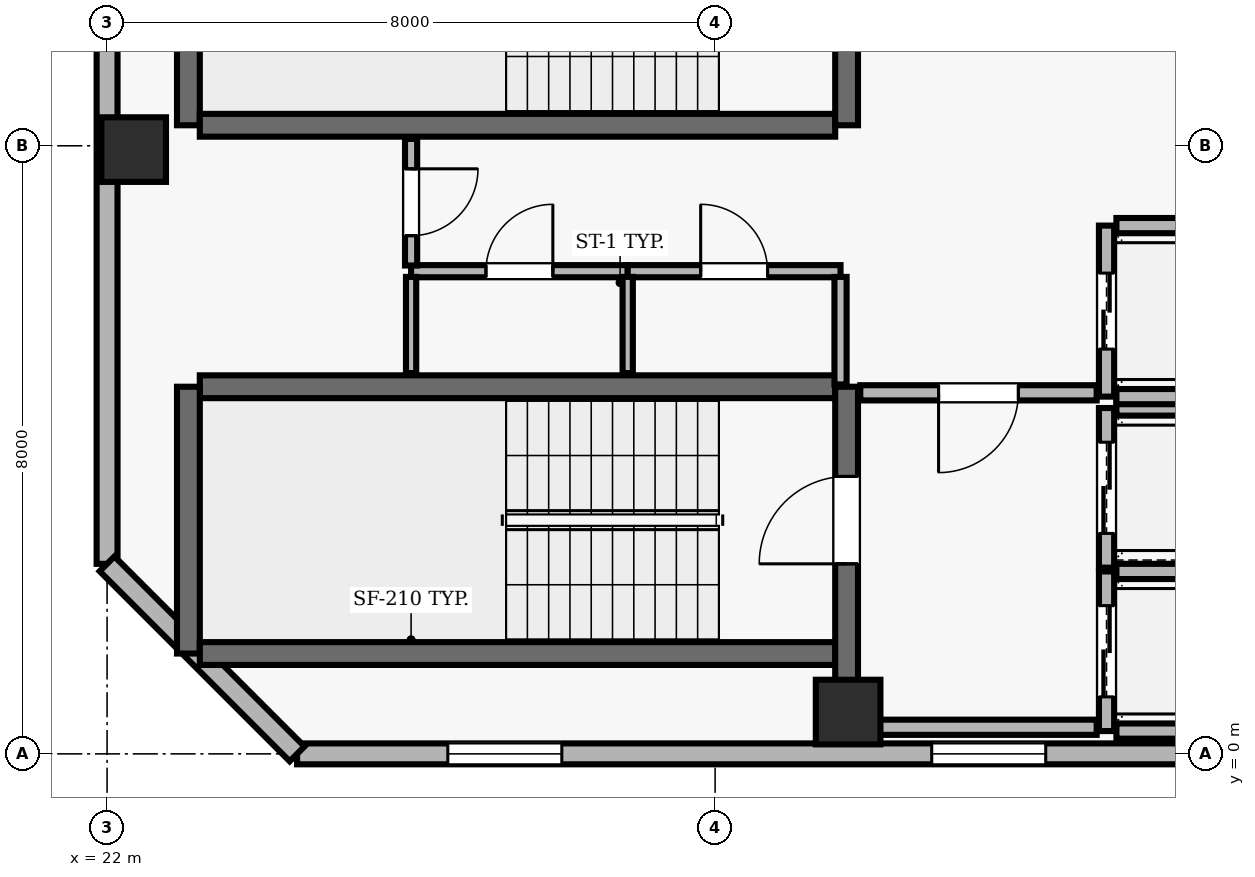
"""IFC4 building model, lengths in metres.
Left out: names, types, materials, properties, quantities, classifications, styles, units other than length and angle.
Written with IfcOpenShell. Run it as: python <this file> out.ifc"""

import sys

from ifc_helpers import new_model, si_unit, direction, frame, frame_2d, origin, origin_2d, place, context, subcontext, project, spatial, rectangle, extrude, element, fill, save


model = new_model("IFC4")
c1 = context("Model", 3, precision=1e-05, world=origin(), true_north=direction((0.0, 1.0)))
c2 = subcontext(c1, "Body", "Model", "MODEL_VIEW")
j1 = project(units=[si_unit("LENGTHUNIT", "METRE"), si_unit("PLANEANGLEUNIT", "RADIAN")], contexts=[c1])
p1 = place(None, origin())
s1 = spatial("IfcSite", under=j1, at=p1, CompositionType="ELEMENT")
p2 = place(p1, origin())
s2 = spatial("IfcBuilding", under=s1, at=p2, CompositionType="ELEMENT")
p3 = place(p2, frame((0.0, 0.0, 267.7)))
s3 = spatial("IfcBuildingStorey", under=s2, at=p3, CompositionType="ELEMENT", Elevation=267.7)
for number, where, z_axis, x_axis in (
    (1, (31.75, 0.55, 0.0), (0.0, 0.0, 1.0), (1.0, 0.0, 0.0)),
    (2, (22.35, 7.95, 0.0), (0.0, 0.0, 1.0), (1.0, 0.0, 0.0)),
):
    element("IfcColumn", number, at=place(p3, frame(where, z_axis=z_axis, x_axis=x_axis)), inside=s3, PredefinedType="COLUMN", context=c2, shape_type="SweptSolid", body=[
        extrude(rectangle(XDim=0.85, YDim=0.85, at=origin_2d()), origin(), (0.0, 0.0, 1.0), 3.9),
    ])
p4 = place(p3, frame((24.5, 0.0, 0.0), z_axis=(0.0, 0.0, 1.0), x_axis=(1.0, 0.0, 0.0)))
e3 = element("IfcWall", 3, at=p4, inside=s3, PredefinedType="SOLIDWALL", context=c2, shape_type="SweptSolid", body=[
    extrude(rectangle(XDim=32.8, YDim=0.275, at=frame_2d((16.4, 0.0))), origin(), (0.0, 0.0, 1.0), 3.69),
])
p5 = place(p4, frame((1.983, 0.0, 0.9)))
e4 = element("IfcOpeningElement", 4, at=p5, cuts=e3, PredefinedType="OPENING", context=c2, shape_type="SweptSolid", body=[
    extrude(rectangle(XDim=1.5, YDim=1.8, at=frame_2d((0.75, 0.9))), frame((0.0, 0.147, 0.0), z_axis=(0.0, -1.0, 0.0), x_axis=(1.0, 0.0, 0.0)), (0.0, 0.0, 1.0), 0.295),
])
p6 = place(p4, frame((8.35, 0.0, 0.9)))
e5 = element("IfcOpeningElement", 5, at=p6, cuts=e3, PredefinedType="OPENING", context=c2, shape_type="SweptSolid", body=[
    extrude(rectangle(XDim=1.5, YDim=1.8, at=frame_2d((0.75, 0.9))), frame((0.0, 0.147, 0.0), z_axis=(0.0, -1.0, 0.0), x_axis=(1.0, 0.0, 0.0)), (0.0, 0.0, 1.0), 0.295),
])
p7 = place(p4, frame((23.85, 0.0, 0.9)))
e6 = element("IfcOpeningElement", 6, at=p7, cuts=e3, PredefinedType="OPENING", context=c2, shape_type="SweptSolid", body=[
    extrude(rectangle(XDim=1.5, YDim=1.8, at=frame_2d((0.75, 0.9))), frame((0.0, 0.147, 0.0), z_axis=(0.0, -1.0, 0.0), x_axis=(1.0, 0.0, 0.0)), (0.0, 0.0, 1.0), 0.295),
])
p8 = place(p4, frame((29.317, 0.0, 0.9)))
e7 = element("IfcOpeningElement", 7, at=p8, cuts=e3, PredefinedType="OPENING", context=c2, shape_type="SweptSolid", body=[
    extrude(rectangle(XDim=1.5, YDim=1.8, at=frame_2d((0.75, 0.9))), frame((0.0, 0.147, 0.0), z_axis=(0.0, -1.0, 0.0), x_axis=(1.0, 0.0, 0.0)), (0.0, 0.0, 1.0), 0.295),
])
p9 = place(p3, frame((22.0, 35.3, 0.0), z_axis=(0.0, 0.0, 1.0), x_axis=(0.0, -1.0, 0.0)))
e8 = element("IfcWall", 8, at=p9, inside=s3, PredefinedType="SOLIDWALL", context=c2, shape_type="SweptSolid", body=[
    extrude(rectangle(XDim=32.8, YDim=0.275, at=frame_2d((16.4, 0.0))), origin(), (0.0, 0.0, 1.0), 3.69),
])
p10 = place(p9, frame((7.3, 0.0, 0.0)))
e9 = element("IfcOpeningElement", 9, at=p10, cuts=e8, PredefinedType="OPENING", context=c2, shape_type="SweptSolid", body=[
    extrude(rectangle(XDim=1.0, YDim=2.2, at=frame_2d((0.5, 1.1))), frame((0.0, 0.147, 0.0), z_axis=(0.0, -1.0, 0.0), x_axis=(1.0, 0.0, 0.0)), (0.0, 0.0, 1.0), 0.295),
])
p11 = place(p9, frame((1.533, 0.0, 0.9)))
e10 = element("IfcOpeningElement", 10, at=p11, cuts=e8, PredefinedType="OPENING", context=c2, shape_type="SweptSolid", body=[
    extrude(rectangle(XDim=1.5, YDim=1.8, at=frame_2d((0.75, 0.9))), frame((0.0, 0.147, 0.0), z_axis=(0.0, -1.0, 0.0), x_axis=(1.0, 0.0, 0.0)), (0.0, 0.0, 1.0), 0.295),
])
p12 = place(p9, frame((12.917, 0.0, 0.9)))
e11 = element("IfcOpeningElement", 11, at=p12, cuts=e8, PredefinedType="OPENING", context=c2, shape_type="SweptSolid", body=[
    extrude(rectangle(XDim=1.5, YDim=1.8, at=frame_2d((0.75, 0.9))), frame((0.0, 0.147, 0.0), z_axis=(0.0, -1.0, 0.0), x_axis=(1.0, 0.0, 0.0)), (0.0, 0.0, 1.0), 0.295),
])
p13 = place(p9, frame((18.383, 0.0, 0.9)))
e12 = element("IfcOpeningElement", 12, at=p13, cuts=e8, PredefinedType="OPENING", context=c2, shape_type="SweptSolid", body=[
    extrude(rectangle(XDim=1.5, YDim=1.8, at=frame_2d((0.75, 0.9))), frame((0.0, 0.147, 0.0), z_axis=(0.0, -1.0, 0.0), x_axis=(1.0, 0.0, 0.0)), (0.0, 0.0, 1.0), 0.295),
])
p14 = place(p9, frame((23.85, 0.0, 0.9)))
e13 = element("IfcOpeningElement", 13, at=p14, cuts=e8, PredefinedType="OPENING", context=c2, shape_type="SweptSolid", body=[
    extrude(rectangle(XDim=1.5, YDim=1.8, at=frame_2d((0.75, 0.9))), frame((0.0, 0.147, 0.0), z_axis=(0.0, -1.0, 0.0), x_axis=(1.0, 0.0, 0.0)), (0.0, 0.0, 1.0), 0.295),
])
p15 = place(p3, frame((22.0, 2.5, 0.0), z_axis=(0.0, 0.0, 1.0), x_axis=(0.707106781187, -0.707106781187, 0.0)))
e14 = element("IfcWall", 14, at=p15, inside=s3, PredefinedType="SOLIDWALL", context=c2, shape_type="SweptSolid", body=[
    extrude(rectangle(XDim=3.536, YDim=0.275, at=frame_2d((1.768, 0.0))), origin(), (0.0, 0.0, 1.0), 3.69),
])
p16 = place(p3, frame((31.58, 4.83, 0.0), z_axis=(0.0, 0.0, 1.0), x_axis=(-1.0, 0.0, 0.0)))
e15 = element("IfcWall", 15, at=p16, inside=s3, PredefinedType="SHEAR", context=c2, shape_type="SweptSolid", body=[
    extrude(rectangle(XDim=8.36, YDim=0.3, at=frame_2d((4.18, 0.0))), origin(), (0.0, 0.0, 1.0), 3.69),
])
p17 = place(p3, frame((23.07, 4.83, 0.0), z_axis=(0.0, 0.0, 1.0), x_axis=(0.0, -1.0, 0.0)))
e16 = element("IfcWall", 16, at=p17, inside=s3, PredefinedType="SHEAR", context=c2, shape_type="SweptSolid", body=[
    extrude(rectangle(XDim=3.51, YDim=0.3, at=frame_2d((1.755, 0.0))), origin(), (0.0, 0.0, 1.0), 3.69),
])
p18 = place(p3, frame((23.22, 1.32, 0.0), z_axis=(0.0, 0.0, 1.0), x_axis=(1.0, 0.0, 0.0)))
e17 = element("IfcWall", 17, at=p18, inside=s3, PredefinedType="SHEAR", context=c2, shape_type="SweptSolid", body=[
    extrude(rectangle(XDim=8.36, YDim=0.3, at=frame_2d((4.18, 0.0))), origin(), (0.0, 0.0, 1.0), 3.69),
])
p19 = place(p3, frame((31.73, 0.96, 0.0), z_axis=(0.0, 0.0, 1.0), x_axis=(0.0, 1.0, 0.0)))
e18 = element("IfcWall", 18, at=p19, inside=s3, PredefinedType="SHEAR", context=c2, shape_type="SweptSolid", body=[
    extrude(rectangle(XDim=3.87, YDim=0.3, at=frame_2d((1.935, 0.0))), origin(), (0.0, 0.0, 1.0), 3.69),
])
p20 = place(p19, frame((1.54, 0.0, 0.0)))
e19 = element("IfcOpeningElement", 19, at=p20, cuts=e18, PredefinedType="OPENING", context=c2, shape_type="SweptSolid", body=[
    extrude(rectangle(XDim=1.15, YDim=2.15, at=frame_2d((0.575, 1.075))), frame((0.0, 0.16, 0.0), z_axis=(0.0, -1.0, 0.0), x_axis=(1.0, 0.0, 0.0)), (0.0, 0.0, 1.0), 0.32),
])
p21 = place(p3, frame((23.07, 11.78, 0.0), z_axis=(0.0, 0.0, 1.0), x_axis=(0.0, -1.0, 0.0)))
e20 = element("IfcWall", 20, at=p21, inside=s3, PredefinedType="SHEAR", context=c2, shape_type="SweptSolid", body=[
    extrude(rectangle(XDim=3.51, YDim=0.3, at=frame_2d((1.755, 0.0))), origin(), (0.0, 0.0, 1.0), 3.69),
])
p22 = place(p3, frame((23.22, 8.27, 0.0), z_axis=(0.0, 0.0, 1.0), x_axis=(1.0, 0.0, 0.0)))
e21 = element("IfcWall", 21, at=p22, inside=s3, PredefinedType="SHEAR", context=c2, shape_type="SweptSolid", body=[
    extrude(rectangle(XDim=8.36, YDim=0.3, at=frame_2d((4.18, 0.0))), origin(), (0.0, 0.0, 1.0), 3.69),
])
p23 = place(p3, frame((31.73, 8.27, 0.0), z_axis=(0.0, 0.0, 1.0), x_axis=(0.0, 1.0, 0.0)))
e22 = element("IfcWall", 22, at=p23, inside=s3, PredefinedType="SHEAR", context=c2, shape_type="SweptSolid", body=[
    extrude(rectangle(XDim=3.51, YDim=0.3, at=frame_2d((1.755, 0.0))), origin(), (0.0, 0.0, 1.0), 3.69),
])
p24 = place(p23, frame((1.18, 0.0, 0.0)))
e23 = element("IfcOpeningElement", 23, at=p24, cuts=e22, PredefinedType="OPENING", context=c2, shape_type="SweptSolid", body=[
    extrude(rectangle(XDim=1.15, YDim=2.15, at=frame_2d((0.575, 1.075))), frame((0.0, 0.16, 0.0), z_axis=(0.0, -1.0, 0.0), x_axis=(1.0, 0.0, 0.0)), (0.0, 0.0, 1.0), 0.32),
])
p25 = place(p3, frame((35.15, 2.4, 0.0), z_axis=(0.0, 0.0, 1.0), x_axis=(0.0, -1.0, 0.0)))
e24 = element("IfcWall", 24, at=p25, inside=s3, PredefinedType="SOLIDWALL", context=c2, shape_type="SweptSolid", body=[
    extrude(rectangle(XDim=2.1, YDim=0.2, at=frame_2d((1.05, 0.0))), origin(), (0.0, 0.0, 1.0), 3.69),
])
p26 = place(p25, frame((0.45, 0.0, 0.0)))
e25 = element("IfcOpeningElement", 25, at=p26, cuts=e24, PredefinedType="OPENING", context=c2, shape_type="SweptSolid", body=[
    extrude(rectangle(XDim=1.2, YDim=2.15, at=frame_2d((0.6, 1.075))), frame((0.0, 0.11, 0.0), z_axis=(0.0, -1.0, 0.0), x_axis=(1.0, 0.0, 0.0)), (0.0, 0.0, 1.0), 0.22),
])
for number, where, z_axis, x_axis in (
    (26, (35.28, 0.3, 0.0), (0.0, 0.0, 1.0), (1.0, 0.0, 0.0)),
    (27, (37.42, 2.4, 0.0), (0.0, 0.0, 1.0), (-1.0, 0.0, 0.0)),
):
    element("IfcWall", number, at=place(p3, frame(where, z_axis=z_axis, x_axis=x_axis)), inside=s3, PredefinedType="SOLIDWALL", context=c2, shape_type="SweptSolid", body=[
        extrude(rectangle(XDim=2.14, YDim=0.2, at=frame_2d((1.07, 0.0))), origin(), (0.0, 0.0, 1.0), 3.69),
    ])
p27 = place(p3, frame((35.15, 4.55, 0.0), z_axis=(0.0, 0.0, 1.0), x_axis=(0.0, -1.0, 0.0)))
e28 = element("IfcWall", 28, at=p27, inside=s3, PredefinedType="SOLIDWALL", context=c2, shape_type="SweptSolid", body=[
    extrude(rectangle(XDim=2.1, YDim=0.2, at=frame_2d((1.05, 0.0))), origin(), (0.0, 0.0, 1.0), 3.69),
])
p28 = place(p27, frame((0.45, 0.0, 0.0)))
e29 = element("IfcOpeningElement", 29, at=p28, cuts=e28, PredefinedType="OPENING", context=c2, shape_type="SweptSolid", body=[
    extrude(rectangle(XDim=1.2, YDim=2.15, at=frame_2d((0.6, 1.075))), frame((0.0, 0.11, 0.0), z_axis=(0.0, -1.0, 0.0), x_axis=(1.0, 0.0, 0.0)), (0.0, 0.0, 1.0), 0.22),
])
p29 = place(p3, frame((37.42, 4.55, 0.0), z_axis=(0.0, 0.0, 1.0), x_axis=(-1.0, 0.0, 0.0)))
e30 = element("IfcWall", 30, at=p29, inside=s3, PredefinedType="SOLIDWALL", context=c2, shape_type="SweptSolid", body=[
    extrude(rectangle(XDim=2.14, YDim=0.2, at=frame_2d((1.07, 0.0))), origin(), (0.0, 0.0, 1.0), 3.69),
])
p30 = place(p3, frame((35.15, 6.95, 0.0), z_axis=(0.0, 0.0, 1.0), x_axis=(0.0, -1.0, 0.0)))
e31 = element("IfcWall", 31, at=p30, inside=s3, PredefinedType="SOLIDWALL", context=c2, shape_type="SweptSolid", body=[
    extrude(rectangle(XDim=2.25, YDim=0.2, at=frame_2d((1.125, 0.0))), origin(), (0.0, 0.0, 1.0), 3.69),
])
p31 = place(p30, frame((0.625, 0.0, 0.0)))
e32 = element("IfcOpeningElement", 32, at=p31, cuts=e31, PredefinedType="OPENING", context=c2, shape_type="SweptSolid", body=[
    extrude(rectangle(XDim=1.0, YDim=2.1, at=frame_2d((0.5, 1.05))), frame((0.0, 0.11, 0.0), z_axis=(0.0, -1.0, 0.0), x_axis=(1.0, 0.0, 0.0)), (0.0, 0.0, 1.0), 0.22),
])
for number, where, z_axis, x_axis in (
    (33, (35.28, 4.7, 0.0), (0.0, 0.0, 1.0), (1.0, 0.0, 0.0)),
    (34, (37.42, 6.95, 0.0), (0.0, 0.0, 1.0), (-1.0, 0.0, 0.0)),
):
    element("IfcWall", number, at=place(p3, frame(where, z_axis=z_axis, x_axis=x_axis)), inside=s3, PredefinedType="SOLIDWALL", context=c2, shape_type="SweptSolid", body=[
        extrude(rectangle(XDim=2.14, YDim=0.2, at=frame_2d((1.07, 0.0))), origin(), (0.0, 0.0, 1.0), 3.69),
    ])
p32 = place(p3, frame((26.0, 6.35, 0.0), z_axis=(0.0, 0.0, 1.0), x_axis=(1.0, 0.0, 0.0)))
e35 = element("IfcWall", 35, at=p32, inside=s3, PredefinedType="PARTITIONING", context=c2, shape_type="SweptSolid", body=[
    extrude(rectangle(XDim=2.85, YDim=0.16, at=frame_2d((1.425, 0.0))), origin(), (0.0, 0.0, 1.0), 3.69),
])
p33 = place(p32, frame((0.985, 0.0, 0.0)))
e36 = element("IfcOpeningElement", 36, at=p33, cuts=e35, PredefinedType="OPENING", context=c2, shape_type="SweptSolid", body=[
    extrude(rectangle(XDim=0.88, YDim=2.1, at=frame_2d((0.44, 1.05))), frame((0.0, 0.09, 0.0), z_axis=(0.0, -1.0, 0.0), x_axis=(1.0, 0.0, 0.0)), (0.0, 0.0, 1.0), 0.18),
])
p34 = place(p3, frame((28.85, 6.35, 0.0), z_axis=(0.0, 0.0, 1.0), x_axis=(1.0, 0.0, 0.0)))
e37 = element("IfcWall", 37, at=p34, inside=s3, PredefinedType="PARTITIONING", context=c2, shape_type="SweptSolid", body=[
    extrude(rectangle(XDim=2.8, YDim=0.16, at=frame_2d((1.4, 0.0))), origin(), (0.0, 0.0, 1.0), 3.69),
])
p35 = place(p34, frame((0.96, 0.0, 0.0)))
e38 = element("IfcOpeningElement", 38, at=p35, cuts=e37, PredefinedType="OPENING", context=c2, shape_type="SweptSolid", body=[
    extrude(rectangle(XDim=0.88, YDim=2.1, at=frame_2d((0.44, 1.05))), frame((0.0, 0.09, 0.0), z_axis=(0.0, -1.0, 0.0), x_axis=(1.0, 0.0, 0.0)), (0.0, 0.0, 1.0), 0.18),
])
p36 = place(p3, frame((31.65, 0.35, 0.0), z_axis=(0.0, 0.0, 1.0), x_axis=(1.0, 0.0, 0.0)))
e39 = element("IfcWall", 39, at=p36, inside=s3, PredefinedType="SOLIDWALL", context=c2, shape_type="SweptSolid", body=[
    extrude(rectangle(XDim=3.37, YDim=0.2, at=frame_2d((1.685, 0.0))), origin(), (0.0, 0.0, 1.0), 3.69),
])
p37 = place(p3, frame((35.02, 4.75, 0.0), z_axis=(0.0, 0.0, 1.0), x_axis=(-1.0, 0.0, 0.0)))
e40 = element("IfcWall", 40, at=p37, inside=s3, PredefinedType="SOLIDWALL", context=c2, shape_type="SweptSolid", body=[
    extrude(rectangle(XDim=3.11, YDim=0.2, at=frame_2d((1.555, 0.0))), origin(), (0.0, 0.0, 1.0), 3.69),
])
p38 = place(p37, frame((1.03, 0.0, 0.0)))
e41 = element("IfcOpeningElement", 41, at=p38, cuts=e40, PredefinedType="OPENING", context=c2, shape_type="SweptSolid", body=[
    extrude(rectangle(XDim=1.05, YDim=2.15, at=frame_2d((0.525, 1.075))), frame((0.0, 0.11, 0.0), z_axis=(0.0, -1.0, 0.0), x_axis=(1.0, 0.0, 0.0)), (0.0, 0.0, 1.0), 0.22),
])
p39 = place(p3, frame((26.0, 5.01, 0.0), z_axis=(0.0, 0.0, 1.0), x_axis=(0.0, 1.0, 0.0)))
e42 = element("IfcWall", 42, at=p39, inside=s3, PredefinedType="PARTITIONING", context=c2, shape_type="SweptSolid", body=[
    extrude(rectangle(XDim=1.265, YDim=0.135, at=frame_2d((0.632, 0.0))), origin(), (0.0, 0.0, 1.0), 3.69),
])
p40 = place(p3, frame((26.0, 8.09, 0.0), z_axis=(0.0, 0.0, 1.0), x_axis=(0.0, -1.0, 0.0)))
e43 = element("IfcWall", 43, at=p40, inside=s3, PredefinedType="PARTITIONING", context=c2, shape_type="SweptSolid", body=[
    extrude(rectangle(XDim=1.665, YDim=0.16, at=frame_2d((0.833, 0.0))), origin(), (0.0, 0.0, 1.0), 3.69),
])
p41 = place(p40, frame((0.393, 0.0, 0.0)))
e44 = element("IfcOpeningElement", 44, at=p41, cuts=e43, PredefinedType="OPENING", context=c2, shape_type="SweptSolid", body=[
    extrude(rectangle(XDim=0.88, YDim=2.1, at=frame_2d((0.44, 1.05))), frame((0.0, 0.09, 0.0), z_axis=(0.0, -1.0, 0.0), x_axis=(1.0, 0.0, 0.0)), (0.0, 0.0, 1.0), 0.18),
])
p42 = place(p3, frame((28.85, 5.01, 0.0), z_axis=(0.0, 0.0, 1.0), x_axis=(0.0, 1.0, 0.0)))
e45 = element("IfcWall", 45, at=p42, inside=s3, PredefinedType="PARTITIONING", context=c2, shape_type="SweptSolid", body=[
    extrude(rectangle(XDim=1.265, YDim=0.135, at=frame_2d((0.632, 0.0))), origin(), (0.0, 0.0, 1.0), 3.69),
])
p43 = place(p3, frame((31.65, 4.86, 0.0), z_axis=(0.0, 0.0, 1.0), x_axis=(0.0, 1.0, 0.0)))
e46 = element("IfcWall", 46, at=p43, inside=s3, PredefinedType="PARTITIONING", context=c2, shape_type="SweptSolid", body=[
    extrude(rectangle(XDim=1.415, YDim=0.16, at=frame_2d((0.708, 0.0))), origin(), (0.0, 0.0, 1.0), 3.69),
])
p44 = place(p5, origin())
e47 = element("IfcWindow", 47, at=p44, inside=s3, PartitioningType="SINGLE_PANEL", PredefinedType="WINDOW", context=c2, shape_type="SweptSolid", body=[
    extrude(rectangle(XDim=1.5, YDim=1.8, at=frame_2d((0.75, 0.9))), frame((0.0, 0.03, 0.0), z_axis=(0.0, -1.0, 0.0), x_axis=(1.0, 0.0, 0.0)), (0.0, 0.0, 1.0), 0.06),
])
fill(e4, e47)
p45 = place(p6, origin())
e48 = element("IfcWindow", 48, at=p45, inside=s3, PartitioningType="SINGLE_PANEL", PredefinedType="WINDOW", context=c2, shape_type="SweptSolid", body=[
    extrude(rectangle(XDim=1.5, YDim=1.8, at=frame_2d((0.75, 0.9))), frame((0.0, 0.03, 0.0), z_axis=(0.0, -1.0, 0.0), x_axis=(1.0, 0.0, 0.0)), (0.0, 0.0, 1.0), 0.06),
])
fill(e5, e48)
p46 = place(p20, origin())
e49 = element("IfcDoor", 49, at=p46, inside=s3, OperationType="SINGLE_SWING_LEFT", PredefinedType="DOOR", context=c2, shape_type="SweptSolid", body=[
    extrude(rectangle(XDim=1.15, YDim=2.15, at=frame_2d((0.575, 1.075))), frame((0.0, 0.025, 0.0), z_axis=(0.0, -1.0, 0.0), x_axis=(1.0, 0.0, 0.0)), (0.0, 0.0, 1.0), 0.05),
])
fill(e19, e49)
p47 = place(p26, origin())
e50 = element("IfcDoor", 50, at=p47, inside=s3, OperationType="DOUBLE_DOOR_SLIDING", PredefinedType="DOOR", context=c2, shape_type="SweptSolid", body=[
    extrude(rectangle(XDim=1.2, YDim=2.15, at=frame_2d((0.6, 1.075))), frame((0.0, 0.025, 0.0), z_axis=(0.0, -1.0, 0.0), x_axis=(1.0, 0.0, 0.0)), (0.0, 0.0, 1.0), 0.05),
])
fill(e25, e50)
p48 = place(p28, origin())
e51 = element("IfcDoor", 51, at=p48, inside=s3, OperationType="DOUBLE_DOOR_SLIDING", PredefinedType="DOOR", context=c2, shape_type="SweptSolid", body=[
    extrude(rectangle(XDim=1.2, YDim=2.15, at=frame_2d((0.6, 1.075))), frame((0.0, 0.025, 0.0), z_axis=(0.0, -1.0, 0.0), x_axis=(1.0, 0.0, 0.0)), (0.0, 0.0, 1.0), 0.05),
])
fill(e29, e51)
p49 = place(p31, origin())
e52 = element("IfcDoor", 52, at=p49, inside=s3, OperationType="DOUBLE_DOOR_SLIDING", PredefinedType="DOOR", context=c2, shape_type="SweptSolid", body=[
    extrude(rectangle(XDim=1.0, YDim=2.1, at=frame_2d((0.5, 1.05))), frame((0.0, 0.025, 0.0), z_axis=(0.0, -1.0, 0.0), x_axis=(1.0, 0.0, 0.0)), (0.0, 0.0, 1.0), 0.05),
])
fill(e32, e52)
p50 = place(p38, origin())
e53 = element("IfcDoor", 53, at=p50, inside=s3, OperationType="SINGLE_SWING_RIGHT", PredefinedType="DOOR", context=c2, shape_type="SweptSolid", body=[
    extrude(rectangle(XDim=1.05, YDim=2.15, at=frame_2d((0.525, 1.075))), frame((0.0, 0.025, 0.0), z_axis=(0.0, -1.0, 0.0), x_axis=(1.0, 0.0, 0.0)), (0.0, 0.0, 1.0), 0.05),
])
fill(e41, e53)
p51 = place(p41, origin())
e54 = element("IfcDoor", 54, at=p51, inside=s3, OperationType="SINGLE_SWING_LEFT", PredefinedType="DOOR", context=c2, shape_type="SweptSolid", body=[
    extrude(rectangle(XDim=0.88, YDim=2.1, at=frame_2d((0.44, 1.05))), frame((0.0, 0.025, 0.0), z_axis=(0.0, -1.0, 0.0), x_axis=(1.0, 0.0, 0.0)), (0.0, 0.0, 1.0), 0.05),
])
fill(e44, e54)
p52 = place(p33, origin())
e55 = element("IfcDoor", 55, at=p52, inside=s3, OperationType="SINGLE_SWING_RIGHT", PredefinedType="DOOR", context=c2, shape_type="SweptSolid", body=[
    extrude(rectangle(XDim=0.88, YDim=2.1, at=frame_2d((0.44, 1.05))), frame((0.0, 0.025, 0.0), z_axis=(0.0, -1.0, 0.0), x_axis=(1.0, 0.0, 0.0)), (0.0, 0.0, 1.0), 0.05),
])
fill(e36, e55)
p53 = place(p35, origin())
e56 = element("IfcDoor", 56, at=p53, inside=s3, OperationType="SINGLE_SWING_LEFT", PredefinedType="DOOR", context=c2, shape_type="SweptSolid", body=[
    extrude(rectangle(XDim=0.88, YDim=2.1, at=frame_2d((0.44, 1.05))), frame((0.0, 0.025, 0.0), z_axis=(0.0, -1.0, 0.0), x_axis=(1.0, 0.0, 0.0)), (0.0, 0.0, 1.0), 0.05),
])
fill(e38, e56)
save(model, sys.argv[1])
